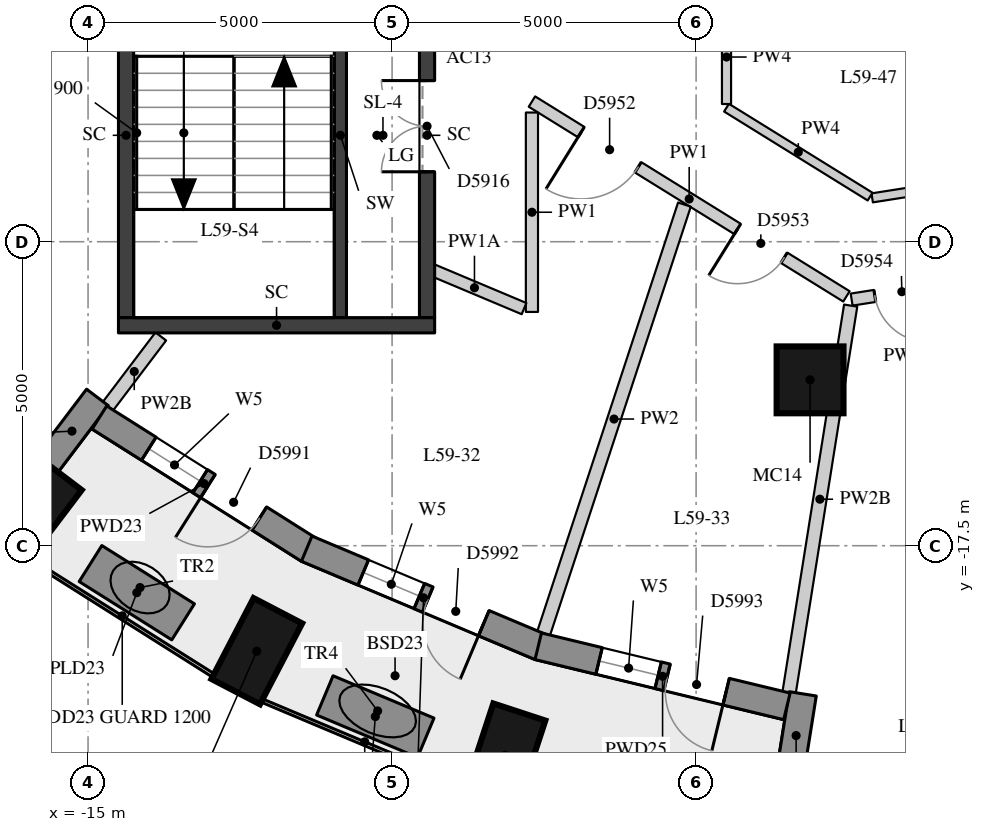
"""IFC4 building model, lengths in metres.
Left out: names, types, materials, properties, quantities, classifications, styles, units other than length and angle.
Written with IfcOpenShell. Run it as: python <this file> out.ifc"""

import sys

from ifc_helpers import new_model, si_unit, direction, frame, frame_2d, origin, origin_2d, place, context, subcontext, project, spatial, rectangle, extrude, element, fill, save


model = new_model("IFC4")
c1 = context("Model", 3, precision=1e-05, world=origin(), true_north=direction((0.0, 1.0)))
c2 = subcontext(c1, "Body", "Model", "MODEL_VIEW")
j1 = project(units=[si_unit("LENGTHUNIT", "METRE"), si_unit("PLANEANGLEUNIT", "RADIAN")], contexts=[c1])
p1 = place(None, origin())
s1 = spatial("IfcSite", under=j1, at=p1, CompositionType="ELEMENT")
p2 = place(p1, origin())
s2 = spatial("IfcBuilding", under=s1, at=p2, CompositionType="ELEMENT")
p3 = place(p2, frame((0.0, 0.0, 209.0)))
s3 = spatial("IfcBuildingStorey", under=s2, at=p3, CompositionType="ELEMENT", Elevation=209.0)
for number, where, z_axis, x_axis in (
    (1, (-15.916, -16.911, 0.0), (0.0, 0.0, 1.0), (-0.604, -0.797, 0.0)),
    (2, (-12.225, -19.235, 0.0), (0.0, 0.0, 1.0), (-0.462, -0.887, 0.0)),
    (3, (-8.141, -20.948, 0.0), (0.0, 0.0, 1.0), (-0.312, -0.95, 0.0)),
):
    element("IfcColumn", number, at=place(p3, frame(where, z_axis=z_axis, x_axis=x_axis)), inside=s3, PredefinedType="COLUMN", context=c2, shape_type="SweptSolid", body=[
        extrude(rectangle(XDim=1.5, YDim=0.9, at=origin_2d()), origin(), (0.0, 0.0, 1.0), 3.3),
    ])
p4 = place(p3, frame((-3.126, -14.772, 0.0), z_axis=(0.0, 0.0, 1.0), x_axis=(1.0, 0.0, 0.0)))
e4 = element("IfcColumn", 4, at=p4, inside=s3, PredefinedType="COLUMN", context=c2, shape_type="SweptSolid", body=[
    extrude(rectangle(XDim=1.1, YDim=1.1, at=origin_2d()), origin(), (0.0, 0.0, 1.0), 3.3),
])
p5 = place(p3, frame((-15.685, -16.17, 0.0), z_axis=(0.0, 0.0, 1.0), x_axis=(0.603644757989, 0.797253414011, 0.0)))
e5 = element("IfcWall", 5, at=p5, inside=s3, PredefinedType="SOLIDWALL", context=c2, shape_type="SweptSolid", body=[
    extrude(rectangle(XDim=1.391, YDim=0.45, at=frame_2d((0.695, 0.0))), origin(), (0.0, 0.0, 1.0), 2.57),
])
p6 = place(p3, frame((-3.464, -21.309, 0.0), z_axis=(0.0, 0.0, 1.0), x_axis=(0.157161757203, 0.98757287431, 0.0)))
e6 = element("IfcWall", 6, at=p6, inside=s3, PredefinedType="SOLIDWALL", context=c2, shape_type="SweptSolid", body=[
    extrude(rectangle(XDim=1.39, YDim=0.45, at=frame_2d((0.695, 0.0))), origin(), (0.0, 0.0, 1.0), 2.57),
])
p7 = place(p3, frame((-14.813, -15.392, 0.0), z_axis=(0.0, 0.0, 1.0), x_axis=(0.84545185308, -0.534051649303, 0.0)))
e7 = element("IfcWall", 7, at=p7, inside=s3, PredefinedType="SOLIDWALL", context=c2, shape_type="SweptSolid", body=[
    extrude(rectangle(XDim=4.071, YDim=0.45, at=frame_2d((2.036, 0.0))), origin(), (0.0, 0.0, 1.0), 3.02),
])
p8 = place(p7, frame((0.961, 0.0, 0.4)))
e8 = element("IfcOpeningElement", 8, at=p8, cuts=e7, PredefinedType="OPENING", context=c2, shape_type="SweptSolid", body=[
    extrude(rectangle(XDim=1.0, YDim=1.75, at=frame_2d((0.5, 0.875))), frame((0.0, 0.235, 0.0), z_axis=(0.0, -1.0, 0.0), x_axis=(1.0, 0.0, 0.0)), (0.0, 0.0, 1.0), 0.47),
])
p9 = place(p7, frame((2.111, 0.0, 0.0)))
e9 = element("IfcOpeningElement", 9, at=p9, cuts=e7, PredefinedType="OPENING", context=c2, shape_type="SweptSolid", body=[
    extrude(rectangle(XDim=1.0, YDim=2.15, at=frame_2d((0.5, 1.075))), frame((0.0, 0.235, 0.0), z_axis=(0.0, -1.0, 0.0), x_axis=(1.0, 0.0, 0.0)), (0.0, 0.0, 1.0), 0.47),
])
p10 = place(p3, frame((-11.404, -17.549, 0.0), z_axis=(0.0, 0.0, 1.0), x_axis=(0.921751093055, -0.387782055351, 0.0)))
e10 = element("IfcWall", 10, at=p10, inside=s3, PredefinedType="SOLIDWALL", context=c2, shape_type="SweptSolid", body=[
    extrude(rectangle(XDim=4.168, YDim=0.45, at=frame_2d((2.084, 0.0))), origin(), (0.0, 0.0, 1.0), 3.02),
])
p11 = place(p10, frame((1.009, 0.0, 0.4)))
e11 = element("IfcOpeningElement", 11, at=p11, cuts=e10, PredefinedType="OPENING", context=c2, shape_type="SweptSolid", body=[
    extrude(rectangle(XDim=1.0, YDim=1.75, at=frame_2d((0.5, 0.875))), frame((0.0, 0.235, 0.0), z_axis=(0.0, -1.0, 0.0), x_axis=(1.0, 0.0, 0.0)), (0.0, 0.0, 1.0), 0.47),
])
p12 = place(p10, frame((2.159, 0.0, 0.0)))
e12 = element("IfcOpeningElement", 12, at=p12, cuts=e10, PredefinedType="OPENING", context=c2, shape_type="SweptSolid", body=[
    extrude(rectangle(XDim=1.0, YDim=2.15, at=frame_2d((0.5, 1.075))), frame((0.0, 0.235, 0.0), z_axis=(0.0, -1.0, 0.0), x_axis=(1.0, 0.0, 0.0)), (0.0, 0.0, 1.0), 0.47),
])
p13 = place(p3, frame((-7.596, -19.154, 0.0), z_axis=(0.0, 0.0, 1.0), x_axis=(0.972004107579, -0.234963858602, 0.0)))
e13 = element("IfcWall", 13, at=p13, inside=s3, PredefinedType="SOLIDWALL", context=c2, shape_type="SweptSolid", body=[
    extrude(rectangle(XDim=4.207, YDim=0.45, at=frame_2d((2.104, 0.0))), origin(), (0.0, 0.0, 1.0), 3.02),
])
p14 = place(p13, frame((1.029, 0.0, 0.4)))
e14 = element("IfcOpeningElement", 14, at=p14, cuts=e13, PredefinedType="OPENING", context=c2, shape_type="SweptSolid", body=[
    extrude(rectangle(XDim=1.0, YDim=1.75, at=frame_2d((0.5, 0.875))), frame((0.0, 0.235, 0.0), z_axis=(0.0, -1.0, 0.0), x_axis=(1.0, 0.0, 0.0)), (0.0, 0.0, 1.0), 0.47),
])
p15 = place(p13, frame((2.179, 0.0, 0.0)))
e15 = element("IfcOpeningElement", 15, at=p15, cuts=e13, PredefinedType="OPENING", context=c2, shape_type="SweptSolid", body=[
    extrude(rectangle(XDim=1.0, YDim=2.15, at=frame_2d((0.5, 1.075))), frame((0.0, 0.235, 0.0), z_axis=(0.0, -1.0, 0.0), x_axis=(1.0, 0.0, 0.0)), (0.0, 0.0, 1.0), 0.47),
])
p16 = place(p3, frame((-14.96, -17.793, 0.0), z_axis=(0.0, 0.0, 1.0), x_axis=(0.846126379677, -0.532982316418, 0.0)))
e16 = element("IfcWall", 16, at=p16, inside=s3, PredefinedType="USERDEFINED", context=c2, shape_type="SweptSolid", body=[
    extrude(rectangle(XDim=1.8, YDim=0.7, at=frame_2d((0.9, 0.0))), origin(), (0.0, 0.0, 1.0), 0.75),
])
p17 = place(p3, frame((-11.106, -19.962, 0.0), z_axis=(0.0, 0.0, 1.0), x_axis=(0.922155368213, -0.386819695564, 0.0)))
e17 = element("IfcWall", 17, at=p17, inside=s3, PredefinedType="USERDEFINED", context=c2, shape_type="SweptSolid", body=[
    extrude(rectangle(XDim=1.8, YDim=0.7, at=frame_2d((0.9, 0.0))), origin(), (0.0, 0.0, 1.0), 0.75),
])
p18 = place(p3, frame((-10.85, -13.75, 0.0), z_axis=(0.0, 0.0, 1.0), x_axis=(0.0, 1.0, 0.0)))
e18 = element("IfcWall", 18, at=p18, inside=s3, PredefinedType="SHEAR", context=c2, shape_type="SweptSolid", body=[
    extrude(rectangle(XDim=6.0, YDim=0.2, at=frame_2d((3.0, 0.0))), origin(), (0.0, 0.0, 1.0), 3.02),
])
p19 = place(p18, frame((4.4, 0.0, 0.0)))
e19 = element("IfcOpeningElement", 19, at=p19, cuts=e18, PredefinedType="OPENING", context=c2, shape_type="SweptSolid", body=[
    extrude(rectangle(XDim=1.5, YDim=2.1, at=frame_2d((0.75, 1.05))), frame((0.0, 0.11, 0.0), z_axis=(0.0, -1.0, 0.0), x_axis=(1.0, 0.0, 0.0)), (0.0, 0.0, 1.0), 0.22),
])
p20 = place(p3, frame((-14.375, -13.75, -0.28), z_axis=(0.0, 0.0, 1.0), x_axis=(0.0, 1.0, 0.0)))
e20 = element("IfcWall", 20, at=p20, inside=s3, PredefinedType="SHEAR", context=c2, shape_type="SweptSolid", body=[
    extrude(rectangle(XDim=6.0, YDim=0.25, at=frame_2d((3.0, 0.0))), origin(), (0.0, 0.0, 1.0), 3.3),
])
p21 = place(p3, frame((-9.425, -13.75, -0.28), z_axis=(0.0, 0.0, 1.0), x_axis=(0.0, 1.0, 0.0)))
e21 = element("IfcWall", 21, at=p21, inside=s3, PredefinedType="SHEAR", context=c2, shape_type="SweptSolid", body=[
    extrude(rectangle(XDim=6.0, YDim=0.25, at=frame_2d((3.0, 0.0))), origin(), (0.0, 0.0, 1.0), 3.3),
])
p22 = place(p21, frame((2.4, 0.0, 0.28)))
e22 = element("IfcOpeningElement", 22, at=p22, cuts=e21, PredefinedType="OPENING", context=c2, shape_type="SweptSolid", body=[
    extrude(rectangle(XDim=1.5, YDim=2.1, at=frame_2d((0.75, 1.05))), frame((0.0, 0.135, 0.0), z_axis=(0.0, -1.0, 0.0), x_axis=(1.0, 0.0, 0.0)), (0.0, 0.0, 1.0), 0.27),
])
p23 = place(p3, frame((-14.5, -13.875, -0.28), z_axis=(0.0, 0.0, 1.0), x_axis=(1.0, 0.0, 0.0)))
e23 = element("IfcWall", 23, at=p23, inside=s3, PredefinedType="SHEAR", context=c2, shape_type="SweptSolid", body=[
    extrude(rectangle(XDim=5.2, YDim=0.25, at=frame_2d((2.6, 0.0))), origin(), (0.0, 0.0, 1.0), 3.3),
])
p24 = place(p3, frame((9.306, -11.603, 0.0), z_axis=(0.0, 0.0, 1.0), x_axis=(-0.987842562114, -0.155457622769, 0.0)))
e24 = element("IfcWall", 24, at=p24, inside=s3, PredefinedType="PARTITIONING", context=c2, shape_type="SweptSolid", body=[
    extrude(rectangle(XDim=11.893, YDim=0.2, at=frame_2d((5.947, 0.0))), origin(), (0.0, 0.0, 1.0), 3.02),
])
p25 = place(p24, frame((10.607, 0.0, 0.0)))
e25 = element("IfcOpeningElement", 25, at=p25, cuts=e24, PredefinedType="OPENING", context=c2, shape_type="SweptSolid", body=[
    extrude(rectangle(XDim=0.9, YDim=2.1, at=frame_2d((0.45, 1.05))), frame((0.0, 0.11, 0.0), z_axis=(0.0, -1.0, 0.0), x_axis=(1.0, 0.0, 0.0)), (0.0, 0.0, 1.0), 0.22),
])
p26 = place(p24, frame((5.829, 0.0, 0.0)))
e26 = element("IfcOpeningElement", 26, at=p26, cuts=e24, PredefinedType="OPENING", context=c2, shape_type="SweptSolid", body=[
    extrude(rectangle(XDim=0.9, YDim=2.1, at=frame_2d((0.45, 1.05))), frame((0.0, 0.11, 0.0), z_axis=(0.0, -1.0, 0.0), x_axis=(1.0, 0.0, 0.0)), (0.0, 0.0, 1.0), 0.22),
])
p27 = place(p24, frame((4.669, 0.0, 0.0)))
e27 = element("IfcOpeningElement", 27, at=p27, cuts=e24, PredefinedType="OPENING", context=c2, shape_type="SweptSolid", body=[
    extrude(rectangle(XDim=0.9, YDim=2.1, at=frame_2d((0.45, 1.05))), frame((0.0, 0.11, 0.0), z_axis=(0.0, -1.0, 0.0), x_axis=(1.0, 0.0, 0.0)), (0.0, 0.0, 1.0), 0.22),
])
p28 = place(p24, frame((0.14, 0.0, 0.0)))
e28 = element("IfcOpeningElement", 28, at=p28, cuts=e24, PredefinedType="OPENING", context=c2, shape_type="SweptSolid", body=[
    extrude(rectangle(XDim=1.1, YDim=2.1, at=frame_2d((0.55, 1.05))), frame((0.0, 0.11, 0.0), z_axis=(0.0, -1.0, 0.0), x_axis=(1.0, 0.0, 0.0)), (0.0, 0.0, 1.0), 0.22),
])
p29 = place(p3, frame((-2.528, -13.4, 0.0), z_axis=(0.0, 0.0, 1.0), x_axis=(-0.850088088191, 0.526640524757, 0.0)))
e29 = element("IfcWall", 29, at=p29, inside=s3, PredefinedType="PARTITIONING", context=c2, shape_type="SweptSolid", body=[
    extrude(rectangle(XDim=6.084, YDim=0.2, at=frame_2d((3.042, 0.0))), origin(), (0.0, 0.0, 1.0), 3.02),
])
p30 = place(p29, frame((4.031, 0.0, 0.0)))
e30 = element("IfcOpeningElement", 30, at=p30, cuts=e29, PredefinedType="OPENING", context=c2, shape_type="SweptSolid", body=[
    extrude(rectangle(XDim=1.1, YDim=2.1, at=frame_2d((0.55, 1.05))), frame((0.0, 0.11, 0.0), z_axis=(0.0, -1.0, 0.0), x_axis=(1.0, 0.0, 0.0)), (0.0, 0.0, 1.0), 0.22),
])
p31 = place(p29, frame((1.206, 0.0, 0.0)))
e31 = element("IfcOpeningElement", 31, at=p31, cuts=e29, PredefinedType="OPENING", context=c2, shape_type="SweptSolid", body=[
    extrude(rectangle(XDim=0.9, YDim=2.1, at=frame_2d((0.45, 1.05))), frame((0.0, 0.11, 0.0), z_axis=(0.0, -1.0, 0.0), x_axis=(1.0, 0.0, 0.0)), (0.0, 0.0, 1.0), 0.22),
])
p32 = place(p3, frame((-7.7, -10.375, 0.0), z_axis=(0.0, 0.0, 1.0), x_axis=(0.0, -1.0, 0.0)))
e32 = element("IfcWall", 32, at=p32, inside=s3, PredefinedType="PARTITIONING", context=c2, shape_type="SweptSolid", body=[
    extrude(rectangle(XDim=3.28, YDim=0.2, at=frame_2d((1.64, 0.0))), origin(), (0.0, 0.0, 1.0), 3.02),
])
p33 = place(p3, frame((-7.83, -13.601, 0.0), z_axis=(0.0, 0.0, 1.0), x_axis=(-0.921793770535, 0.387680596112, 0.0)))
e33 = element("IfcWall", 33, at=p33, inside=s3, PredefinedType="PARTITIONING", context=c2, shape_type="SweptSolid", body=[
    extrude(rectangle(XDim=1.769, YDim=0.2, at=frame_2d((0.885, 0.0))), origin(), (0.0, 0.0, 1.0), 2.57),
])
p34 = place(p3, frame((0.921, -11.303, 0.0), z_axis=(0.0, 0.0, 1.0), x_axis=(-0.987854584084, -0.15538121091, 0.0)))
e34 = element("IfcWall", 34, at=p34, inside=s3, PredefinedType="PARTITIONING", context=c2, shape_type="SweptSolid", body=[
    extrude(rectangle(XDim=3.062, YDim=0.15, at=frame_2d((1.531, 0.0))), origin(), (0.0, 0.0, 1.0), 3.02),
])
p35 = place(p3, frame((-2.138, -11.758, 0.0), z_axis=(0.0, 0.0, 1.0), x_axis=(-0.850109654363, 0.526605711666, 0.0)))
e35 = element("IfcWall", 35, at=p35, inside=s3, PredefinedType="PARTITIONING", context=c2, shape_type="SweptSolid", body=[
    extrude(rectangle(XDim=2.778, YDim=0.15, at=frame_2d((1.389, 0.0))), origin(), (0.0, 0.0, 1.0), 3.02),
])
p36 = place(p3, frame((-4.5, -10.235, 0.0), z_axis=(0.0, 0.0, 1.0), x_axis=(0.0, 1.0, 0.0)))
e36 = element("IfcWall", 36, at=p36, inside=s3, PredefinedType="PARTITIONING", context=c2, shape_type="SweptSolid", body=[
    extrude(rectangle(XDim=1.545, YDim=0.15, at=frame_2d((0.772, 0.0))), origin(), (0.0, 0.0, 1.0), 3.02),
])
p37 = place(p3, frame((-14.677, -15.211, 0.0), z_axis=(0.0, 0.0, 1.0), x_axis=(0.603665965776, 0.797237355976, 0.0)))
e37 = element("IfcWall", 37, at=p37, inside=s3, PredefinedType="PARTITIONING", context=c2, shape_type="SweptSolid", body=[
    extrude(rectangle(XDim=1.447, YDim=0.22, at=frame_2d((0.723, 0.0))), origin(), (0.0, 0.0, 1.0), 2.57),
])
p38 = place(p3, frame((-7.508, -18.944, 0.0), z_axis=(0.0, 0.0, 1.0), x_axis=(0.311962912662, 0.950094280124, 0.0)))
e38 = element("IfcWall", 38, at=p38, inside=s3, PredefinedType="PARTITIONING", context=c2, shape_type="SweptSolid", body=[
    extrude(rectangle(XDim=7.425, YDim=0.22, at=frame_2d((3.712, 0.0))), origin(), (0.0, 0.0, 1.0), 3.02),
])
p39 = place(p3, frame((-3.471, -19.919, 0.0), z_axis=(0.0, 0.0, 1.0), x_axis=(0.157082319053, 0.987585512774, 0.0)))
e39 = element("IfcWall", 39, at=p39, inside=s3, PredefinedType="PARTITIONING", context=c2, shape_type="SweptSolid", body=[
    extrude(rectangle(XDim=6.448, YDim=0.22, at=frame_2d((3.224, 0.0))), origin(), (0.0, 0.0, 1.0), 2.57),
])
p40 = place(p8, origin())
e40 = element("IfcWindow", 40, at=p40, inside=s3, PartitioningType="SINGLE_PANEL", PredefinedType="WINDOW", context=c2, shape_type="SweptSolid", body=[
    extrude(rectangle(XDim=1.0, YDim=1.75, at=frame_2d((0.5, 0.875))), frame((0.0, 0.035, 0.0), z_axis=(0.0, -1.0, 0.0), x_axis=(1.0, 0.0, 0.0)), (0.0, 0.0, 1.0), 0.06),
])
fill(e8, e40)
p41 = place(p9, frame((1.0, 0.0, 0.0), z_axis=(0.0, 0.0, 1.0), x_axis=(-1.0, 0.0, 0.0)))
e41 = element("IfcDoor", 41, at=p41, inside=s3, OperationType="SINGLE_SWING_RIGHT", PredefinedType="DOOR", context=c2, shape_type="SweptSolid", body=[
    extrude(rectangle(XDim=1.0, YDim=2.15, at=frame_2d((0.5, 1.075))), frame((0.0, 0.075, 0.0), z_axis=(0.0, -1.0, 0.0), x_axis=(1.0, 0.0, 0.0)), (0.0, 0.0, 1.0), 0.05),
])
fill(e9, e41)
p42 = place(p11, origin())
e42 = element("IfcWindow", 42, at=p42, inside=s3, PartitioningType="SINGLE_PANEL", PredefinedType="WINDOW", context=c2, shape_type="SweptSolid", body=[
    extrude(rectangle(XDim=1.0, YDim=1.75, at=frame_2d((0.5, 0.875))), frame((0.0, 0.035, 0.0), z_axis=(0.0, -1.0, 0.0), x_axis=(1.0, 0.0, 0.0)), (0.0, 0.0, 1.0), 0.06),
])
fill(e11, e42)
p43 = place(p12, frame((1.0, 0.0, 0.0), z_axis=(0.0, 0.0, 1.0), x_axis=(-1.0, 0.0, 0.0)))
e43 = element("IfcDoor", 43, at=p43, inside=s3, OperationType="SINGLE_SWING_LEFT", PredefinedType="DOOR", context=c2, shape_type="SweptSolid", body=[
    extrude(rectangle(XDim=1.0, YDim=2.15, at=frame_2d((0.5, 1.075))), frame((0.0, 0.075, 0.0), z_axis=(0.0, -1.0, 0.0), x_axis=(1.0, 0.0, 0.0)), (0.0, 0.0, 1.0), 0.05),
])
fill(e12, e43)
p44 = place(p14, origin())
e44 = element("IfcWindow", 44, at=p44, inside=s3, PartitioningType="SINGLE_PANEL", PredefinedType="WINDOW", context=c2, shape_type="SweptSolid", body=[
    extrude(rectangle(XDim=1.0, YDim=1.75, at=frame_2d((0.5, 0.875))), frame((0.0, 0.035, 0.0), z_axis=(0.0, -1.0, 0.0), x_axis=(1.0, 0.0, 0.0)), (0.0, 0.0, 1.0), 0.06),
])
fill(e14, e44)
p45 = place(p15, frame((1.0, 0.0, 0.0), z_axis=(0.0, 0.0, 1.0), x_axis=(-1.0, 0.0, 0.0)))
e45 = element("IfcDoor", 45, at=p45, inside=s3, OperationType="SINGLE_SWING_LEFT", PredefinedType="DOOR", context=c2, shape_type="SweptSolid", body=[
    extrude(rectangle(XDim=1.0, YDim=2.15, at=frame_2d((0.5, 1.075))), frame((0.0, 0.075, 0.0), z_axis=(0.0, -1.0, 0.0), x_axis=(1.0, 0.0, 0.0)), (0.0, 0.0, 1.0), 0.05),
])
fill(e15, e45)
p46 = place(p22, origin())
e46 = element("IfcDoor", 46, at=p46, inside=s3, OperationType="DOUBLE_DOOR_SINGLE_SWING", PredefinedType="DOOR", context=c2, shape_type="SweptSolid", body=[
    extrude(rectangle(XDim=1.5, YDim=2.1, at=frame_2d((0.75, 1.05))), frame((0.0, 0.025, 0.0), z_axis=(0.0, -1.0, 0.0), x_axis=(1.0, 0.0, 0.0)), (0.0, 0.0, 1.0), 0.05),
])
fill(e22, e46)
p47 = place(p30, origin())
e47 = element("IfcDoor", 47, at=p47, inside=s3, OperationType="SINGLE_SWING_RIGHT", PredefinedType="DOOR", context=c2, shape_type="SweptSolid", body=[
    extrude(rectangle(XDim=1.1, YDim=2.1, at=frame_2d((0.55, 1.05))), frame((0.0, 0.025, 0.0), z_axis=(0.0, -1.0, 0.0), x_axis=(1.0, 0.0, 0.0)), (0.0, 0.0, 1.0), 0.05),
])
fill(e30, e47)
p48 = place(p31, origin())
e48 = element("IfcDoor", 48, at=p48, inside=s3, OperationType="SINGLE_SWING_RIGHT", PredefinedType="DOOR", context=c2, shape_type="SweptSolid", body=[
    extrude(rectangle(XDim=0.9, YDim=2.1, at=frame_2d((0.45, 1.05))), frame((0.0, 0.025, 0.0), z_axis=(0.0, -1.0, 0.0), x_axis=(1.0, 0.0, 0.0)), (0.0, 0.0, 1.0), 0.05),
])
fill(e31, e48)
p49 = place(p25, origin())
e49 = element("IfcDoor", 49, at=p49, inside=s3, OperationType="SINGLE_SWING_LEFT", PredefinedType="DOOR", context=c2, shape_type="SweptSolid", body=[
    extrude(rectangle(XDim=0.9, YDim=2.1, at=frame_2d((0.45, 1.05))), frame((0.0, 0.025, 0.0), z_axis=(0.0, -1.0, 0.0), x_axis=(1.0, 0.0, 0.0)), (0.0, 0.0, 1.0), 0.05),
])
fill(e25, e49)
save(model, sys.argv[1])
